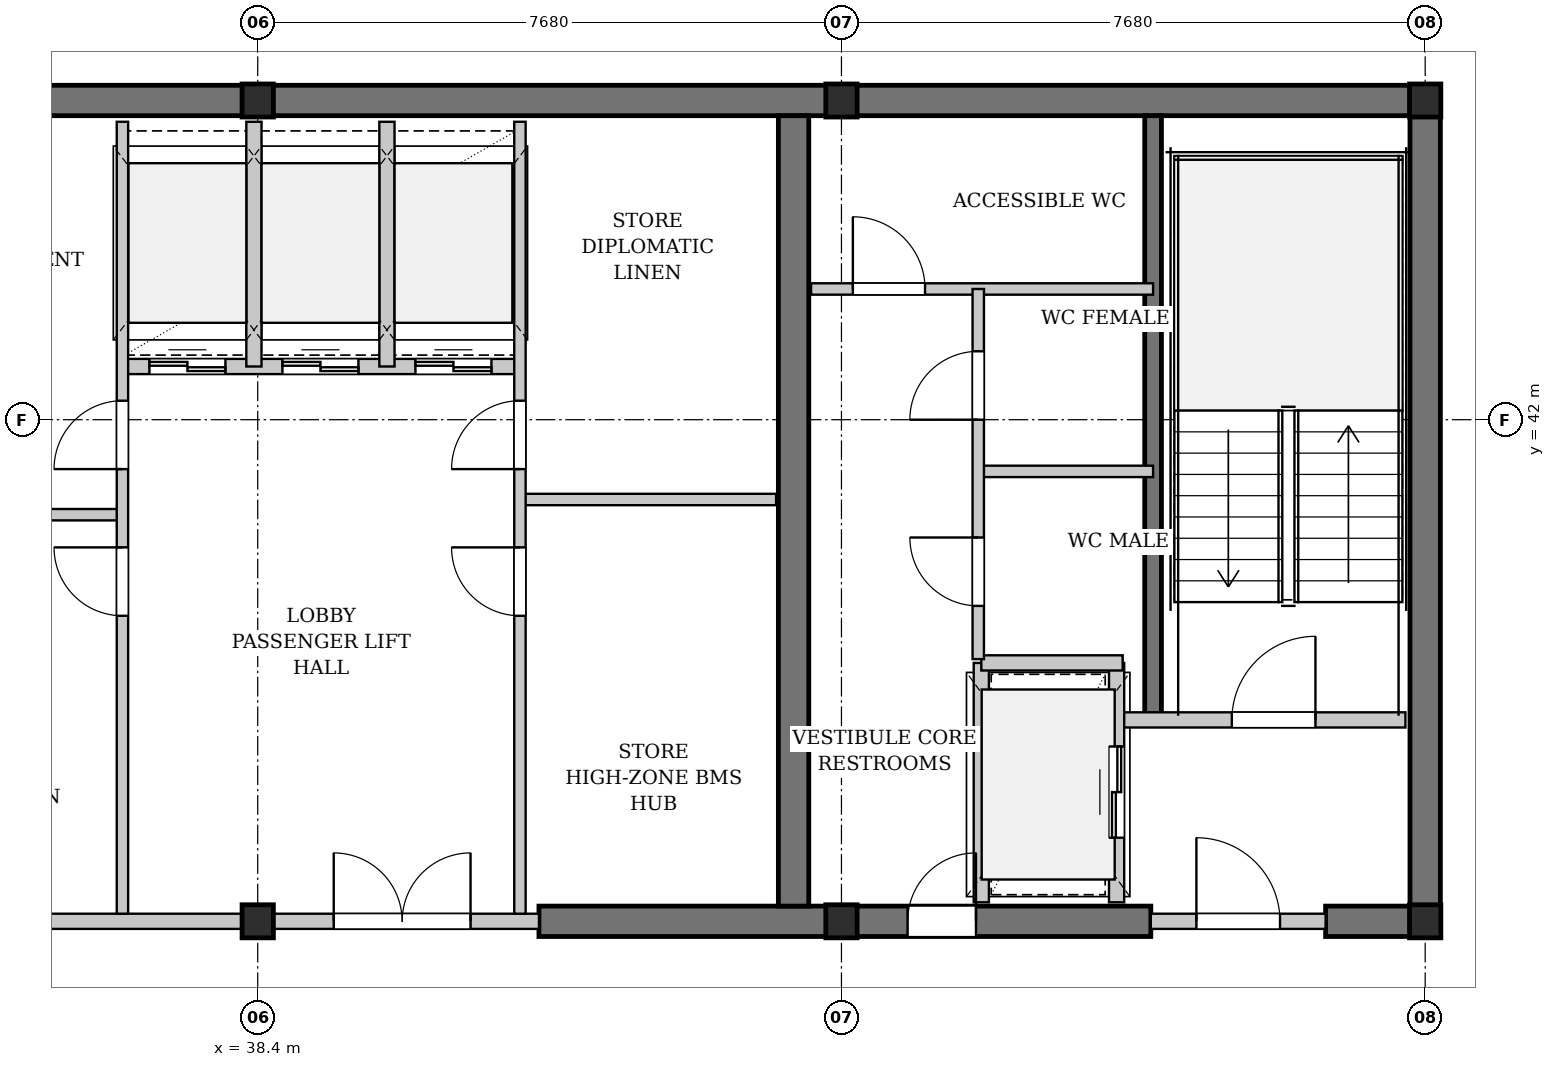
"""IFC4 building model, lengths in metres.
Left out: names, types, materials, properties, quantities, classifications, styles, units other than length and angle.
Written with IfcOpenShell. Run it as: python <this file> out.ifc"""

import sys

from ifc_helpers import new_model, si_unit, direction, frame, frame_2d, origin, origin_2d, place, context, subcontext, project, spatial, rectangle, i_section, extrude, element, fill, save


model = new_model("IFC4")
c1 = context("Model", 3, precision=1e-05, world=origin(), true_north=direction((0.0, 1.0)))
c2 = subcontext(c1, "Body", "Model", "MODEL_VIEW")
j1 = project(units=[si_unit("LENGTHUNIT", "METRE"), si_unit("PLANEANGLEUNIT", "RADIAN")], contexts=[c1])
p1 = place(None, origin())
s1 = spatial("IfcSite", under=j1, at=p1, CompositionType="ELEMENT")
p2 = place(p1, origin())
s2 = spatial("IfcBuilding", under=s1, at=p2, CompositionType="ELEMENT")
p3 = place(p2, frame((0.0, 0.0, 237.5)))
s3 = spatial("IfcBuildingStorey", under=s2, at=p3, CompositionType="ELEMENT", Elevation=237.5)
p4 = place(p3, frame((22.84, 46.2, 0.0), z_axis=(0.0, 0.0, 1.0), x_axis=(1.0, 0.0, 0.0)))
e1 = element("IfcWall", 1, at=p4, inside=s3, PredefinedType="SHEAR", context=c2, shape_type="SweptSolid", body=[
    extrude(rectangle(XDim=31.12, YDim=0.4, at=frame_2d((15.56, 0.0))), origin(), (0.0, 0.0, 1.0), 3.08),
])
p5 = place(p3, frame((42.1, 35.4, 0.0), z_axis=(0.0, 0.0, 1.0), x_axis=(1.0, 0.0, 0.0)))
e2 = element("IfcWall", 2, at=p5, inside=s3, PredefinedType="SHEAR", context=c2, shape_type="SweptSolid", body=[
    extrude(rectangle(XDim=8.05, YDim=0.4, at=frame_2d((4.025, 0.0))), origin(), (0.0, 0.0, 1.0), 3.08),
])
p6 = place(p5, frame((4.85, 0.0, 0.0)))
e3 = element("IfcOpeningElement", 3, at=p6, cuts=e2, PredefinedType="OPENING", context=c2, shape_type="SweptSolid", body=[
    extrude(rectangle(XDim=0.9, YDim=2.15, at=frame_2d((0.45, 1.075))), frame((0.0, 0.21, 0.0), z_axis=(0.0, -1.0, 0.0), x_axis=(1.0, 0.0, 0.0)), (0.0, 0.0, 1.0), 0.42),
])
p7 = place(p3, frame((52.45, 35.4, 0.0), z_axis=(0.0, 0.0, 1.0), x_axis=(1.0, 0.0, 0.0)))
e4 = element("IfcWall", 4, at=p7, inside=s3, PredefinedType="SHEAR", context=c2, shape_type="SweptSolid", body=[
    extrude(rectangle(XDim=1.51, YDim=0.4, at=frame_2d((0.755, 0.0))), origin(), (0.0, 0.0, 1.0), 3.08),
])
for number, where, z_axis, x_axis in (
    (5, (45.45, 35.6, 0.0), (0.0, 0.0, 1.0), (0.0, 1.0, 0.0)),
    (6, (53.76, 35.6, 0.0), (0.0, 0.0, 1.0), (0.0, 1.0, 0.0)),
):
    element("IfcWall", number, at=place(p3, frame(where, z_axis=z_axis, x_axis=x_axis)), inside=s3, PredefinedType="SHEAR", context=c2, shape_type="SweptSolid", body=[
        extrude(rectangle(XDim=10.4, YDim=0.4, at=frame_2d((5.2, 0.0))), origin(), (0.0, 0.0, 1.0), 3.08),
    ])
p8 = place(p3, frame((50.18, 38.05, 0.0), z_axis=(0.0, 0.0, 1.0), x_axis=(0.0, 1.0, 0.0)))
e7 = element("IfcWall", 7, at=p8, inside=s3, PredefinedType="SHEAR", context=c2, shape_type="SweptSolid", body=[
    extrude(rectangle(XDim=7.95, YDim=0.22, at=frame_2d((3.975, 0.0))), origin(), (0.0, 0.0, 1.0), 3.08),
])
for number, where, z_axis, x_axis in (
    (8, (38.4, 35.4, 0.0), (0.0, 0.0, 1.0), (1.0, 0.0, 0.0)),
    (9, (38.4, 46.2, 0.0), (0.0, 0.0, 1.0), (1.0, 0.0, 0.0)),
    (10, (46.08, 35.4, 0.0), (0.0, 0.0, 1.0), (1.0, 0.0, 0.0)),
    (11, (46.08, 46.2, 0.0), (0.0, 0.0, 1.0), (1.0, 0.0, 0.0)),
    (12, (53.76, 35.4, 0.0), (0.0, 0.0, 1.0), (1.0, 0.0, 0.0)),
    (13, (53.76, 46.2, 0.0), (0.0, 0.0, 1.0), (1.0, 0.0, 0.0)),
):
    element("IfcColumn", number, at=place(p3, frame(where, z_axis=z_axis, x_axis=x_axis)), inside=s3, PredefinedType="COLUMN", context=c2, shape_type="SweptSolid", body=[
        extrude(i_section(OverallWidth=0.412, OverallDepth=0.435, WebThickness=0.036, FlangeThickness=0.058, FilletRadius=0.015, at=origin_2d()), origin(), (0.0, 0.0, 1.0), 3.3),
    ])
p9 = place(p3, frame((35.6, 35.4, 0.0), z_axis=(0.0, 0.0, 1.0), x_axis=(1.0, 0.0, 0.0)))
e14 = element("IfcWall", 14, at=p9, inside=s3, PredefinedType="PARTITIONING", context=c2, shape_type="SweptSolid", body=[
    extrude(rectangle(XDim=6.5, YDim=0.2, at=frame_2d((3.25, 0.0))), origin(), (0.0, 0.0, 1.0), 2.313),
])
p10 = place(p9, frame((3.8, 0.0, 0.0)))
e15 = element("IfcOpeningElement", 15, at=p10, cuts=e14, PredefinedType="OPENING", context=c2, shape_type="SweptSolid", body=[
    extrude(rectangle(XDim=1.8, YDim=2.3, at=frame_2d((0.9, 1.15))), frame((0.0, 0.11, 0.0), z_axis=(0.0, -1.0, 0.0), x_axis=(1.0, 0.0, 0.0)), (0.0, 0.0, 1.0), 0.22),
])
p11 = place(p3, frame((36.6, 42.7, 0.0), z_axis=(0.0, 0.0, 1.0), x_axis=(1.0, 0.0, 0.0)))
e16 = element("IfcWall", 16, at=p11, inside=s3, PredefinedType="PARTITIONING", context=c2, shape_type="SweptSolid", body=[
    extrude(rectangle(XDim=5.25, YDim=0.2, at=frame_2d((2.625, 0.0))), origin(), (0.0, 0.0, 1.0), 3.08),
])
p12 = place(p11, frame((0.375, 0.0, 0.0)))
e17 = element("IfcOpeningElement", 17, at=p12, cuts=e16, PredefinedType="OPENING", context=c2, shape_type="SweptSolid", body=[
    extrude(rectangle(XDim=1.0, YDim=2.2, at=frame_2d((0.5, 1.1))), frame((0.0, 0.11, 0.0), z_axis=(0.0, -1.0, 0.0), x_axis=(1.0, 0.0, 0.0)), (0.0, 0.0, 1.0), 0.22),
])
p13 = place(p11, frame((2.125, 0.0, 0.0)))
e18 = element("IfcOpeningElement", 18, at=p13, cuts=e16, PredefinedType="OPENING", context=c2, shape_type="SweptSolid", body=[
    extrude(rectangle(XDim=1.0, YDim=2.2, at=frame_2d((0.5, 1.1))), frame((0.0, 0.11, 0.0), z_axis=(0.0, -1.0, 0.0), x_axis=(1.0, 0.0, 0.0)), (0.0, 0.0, 1.0), 0.22),
])
p14 = place(p11, frame((3.875, 0.0, 0.0)))
e19 = element("IfcOpeningElement", 19, at=p14, cuts=e16, PredefinedType="OPENING", context=c2, shape_type="SweptSolid", body=[
    extrude(rectangle(XDim=1.0, YDim=2.2, at=frame_2d((0.5, 1.1))), frame((0.0, 0.11, 0.0), z_axis=(0.0, -1.0, 0.0), x_axis=(1.0, 0.0, 0.0)), (0.0, 0.0, 1.0), 0.22),
])
p15 = place(p3, frame((38.35, 42.7, 0.0), z_axis=(0.0, 0.0, 1.0), x_axis=(0.0, 1.0, 0.0)))
e20 = element("IfcWall", 20, at=p15, inside=s3, PredefinedType="PARTITIONING", context=c2, shape_type="SweptSolid", body=[
    extrude(rectangle(XDim=3.22, YDim=0.2, at=frame_2d((1.61, 0.0))), origin(), (0.0, 0.0, 1.0), 2.313),
])
p16 = place(p3, frame((40.1, 42.7, 0.0), z_axis=(0.0, 0.0, 1.0), x_axis=(0.0, 1.0, 0.0)))
e21 = element("IfcWall", 21, at=p16, inside=s3, PredefinedType="PARTITIONING", context=c2, shape_type="SweptSolid", body=[
    extrude(rectangle(XDim=3.22, YDim=0.2, at=frame_2d((1.61, 0.0))), origin(), (0.0, 0.0, 1.0), 3.08),
])
p17 = place(p3, frame((33.05, 40.75, 0.0), z_axis=(0.0, 0.0, 1.0), x_axis=(1.0, 0.0, 0.0)))
e22 = element("IfcWall", 22, at=p17, inside=s3, PredefinedType="PARTITIONING", context=c2, shape_type="SweptSolid", body=[
    extrude(rectangle(XDim=3.57, YDim=0.15, at=frame_2d((1.785, 0.0))), origin(), (0.0, 0.0, 1.0), 3.08),
])
p18 = place(p3, frame((36.62, 35.5, 0.0), z_axis=(0.0, 0.0, 1.0), x_axis=(0.0, 1.0, 0.0)))
e23 = element("IfcWall", 23, at=p18, inside=s3, PredefinedType="PARTITIONING", context=c2, shape_type="SweptSolid", body=[
    extrude(rectangle(XDim=10.42, YDim=0.15, at=frame_2d((5.21, 0.0))), origin(), (0.0, 0.0, 1.0), 3.08),
])
p19 = place(p18, frame((3.92, 0.0, 0.0)))
e24 = element("IfcOpeningElement", 24, at=p19, cuts=e23, PredefinedType="OPENING", context=c2, shape_type="SweptSolid", body=[
    extrude(rectangle(XDim=0.9, YDim=2.15, at=frame_2d((0.45, 1.075))), frame((0.0, 0.085, 0.0), z_axis=(0.0, -1.0, 0.0), x_axis=(1.0, 0.0, 0.0)), (0.0, 0.0, 1.0), 0.17),
])
p20 = place(p18, frame((5.85, 0.0, 0.0)))
e25 = element("IfcOpeningElement", 25, at=p20, cuts=e23, PredefinedType="OPENING", context=c2, shape_type="SweptSolid", body=[
    extrude(rectangle(XDim=0.9, YDim=2.15, at=frame_2d((0.45, 1.075))), frame((0.0, 0.085, 0.0), z_axis=(0.0, -1.0, 0.0), x_axis=(1.0, 0.0, 0.0)), (0.0, 0.0, 1.0), 0.17),
])
p21 = place(p3, frame((41.85, 40.95, 0.0), z_axis=(0.0, 0.0, 1.0), x_axis=(1.0, 0.0, 0.0)))
e26 = element("IfcWall", 26, at=p21, inside=s3, PredefinedType="PARTITIONING", context=c2, shape_type="SweptSolid", body=[
    extrude(rectangle(XDim=3.37, YDim=0.15, at=frame_2d((1.685, 0.0))), origin(), (0.0, 0.0, 1.0), 3.08),
])
p22 = place(p3, frame((41.85, 35.5, 0.0), z_axis=(0.0, 0.0, 1.0), x_axis=(0.0, 1.0, 0.0)))
e27 = element("IfcWall", 27, at=p22, inside=s3, PredefinedType="PARTITIONING", context=c2, shape_type="SweptSolid", body=[
    extrude(rectangle(XDim=10.42, YDim=0.15, at=frame_2d((5.21, 0.0))), origin(), (0.0, 0.0, 1.0), 3.08),
])
p23 = place(p22, frame((3.92, 0.0, 0.0)))
e28 = element("IfcOpeningElement", 28, at=p23, cuts=e27, PredefinedType="OPENING", context=c2, shape_type="SweptSolid", body=[
    extrude(rectangle(XDim=0.9, YDim=2.15, at=frame_2d((0.45, 1.075))), frame((0.0, 0.085, 0.0), z_axis=(0.0, -1.0, 0.0), x_axis=(1.0, 0.0, 0.0)), (0.0, 0.0, 1.0), 0.17),
])
p24 = place(p22, frame((5.85, 0.0, 0.0)))
e29 = element("IfcOpeningElement", 29, at=p24, cuts=e27, PredefinedType="OPENING", context=c2, shape_type="SweptSolid", body=[
    extrude(rectangle(XDim=0.9, YDim=2.15, at=frame_2d((0.45, 1.075))), frame((0.0, 0.085, 0.0), z_axis=(0.0, -1.0, 0.0), x_axis=(1.0, 0.0, 0.0)), (0.0, 0.0, 1.0), 0.17),
])
p25 = place(p3, frame((49.78, 38.05, 0.0), z_axis=(0.0, 0.0, 1.0), x_axis=(1.0, 0.0, 0.0)))
e30 = element("IfcWall", 30, at=p25, inside=s3, PredefinedType="PARTITIONING", context=c2, shape_type="SweptSolid", body=[
    extrude(rectangle(XDim=3.72, YDim=0.2, at=frame_2d((1.86, 0.0))), origin(), (0.0, 0.0, 1.0), 3.08),
])
p26 = place(p25, frame((1.436, 0.0, 0.0)))
e31 = element("IfcOpeningElement", 31, at=p26, cuts=e30, PredefinedType="OPENING", context=c2, shape_type="SweptSolid", body=[
    extrude(rectangle(XDim=1.1, YDim=2.15, at=frame_2d((0.55, 1.075))), frame((0.0, 0.11, 0.0), z_axis=(0.0, -1.0, 0.0), x_axis=(1.0, 0.0, 0.0)), (0.0, 0.0, 1.0), 0.22),
])
p27 = place(p3, frame((50.15, 35.4, 0.0), z_axis=(0.0, 0.0, 1.0), x_axis=(1.0, 0.0, 0.0)))
e32 = element("IfcWall", 32, at=p27, inside=s3, PredefinedType="PARTITIONING", context=c2, shape_type="SweptSolid", body=[
    extrude(rectangle(XDim=2.3, YDim=0.2, at=frame_2d((1.15, 0.0))), origin(), (0.0, 0.0, 1.0), 2.313),
])
p28 = place(p27, frame((0.6, 0.0, 0.0)))
e33 = element("IfcOpeningElement", 33, at=p28, cuts=e32, PredefinedType="OPENING", context=c2, shape_type="SweptSolid", body=[
    extrude(rectangle(XDim=1.1, YDim=2.15, at=frame_2d((0.55, 1.075))), frame((0.0, 0.11, 0.0), z_axis=(0.0, -1.0, 0.0), x_axis=(1.0, 0.0, 0.0)), (0.0, 0.0, 1.0), 0.22),
])
p29 = place(p3, frame((49.7, 35.65, 0.0), z_axis=(0.0, 0.0, 1.0), x_axis=(0.0, 1.0, 0.0)))
e34 = element("IfcWall", 34, at=p29, inside=s3, PredefinedType="PARTITIONING", context=c2, shape_type="SweptSolid", body=[
    extrude(rectangle(XDim=3.15, YDim=0.2, at=frame_2d((1.575, 0.0))), origin(), (0.0, 0.0, 1.0), 3.08),
])
p30 = place(p29, frame((0.85, 0.0, 0.0)))
e35 = element("IfcOpeningElement", 35, at=p30, cuts=e34, PredefinedType="OPENING", context=c2, shape_type="SweptSolid", body=[
    extrude(rectangle(XDim=1.2, YDim=2.2, at=frame_2d((0.6, 1.1))), frame((0.0, 0.11, 0.0), z_axis=(0.0, -1.0, 0.0), x_axis=(1.0, 0.0, 0.0)), (0.0, 0.0, 1.0), 0.22),
])
p31 = place(p3, frame((47.92, 35.65, 0.0), z_axis=(0.0, 0.0, 1.0), x_axis=(0.0, 1.0, 0.0)))
e36 = element("IfcWall", 36, at=p31, inside=s3, PredefinedType="PARTITIONING", context=c2, shape_type="SweptSolid", body=[
    extrude(rectangle(XDim=3.15, YDim=0.2, at=frame_2d((1.575, 0.0))), origin(), (0.0, 0.0, 1.0), 3.08),
])
p32 = place(p3, frame((47.92, 38.8, 0.0), z_axis=(0.0, 0.0, 1.0), x_axis=(1.0, 0.0, 0.0)))
e37 = element("IfcWall", 37, at=p32, inside=s3, PredefinedType="PARTITIONING", context=c2, shape_type="SweptSolid", body=[
    extrude(rectangle(XDim=1.86, YDim=0.2, at=frame_2d((0.93, 0.0))), origin(), (0.0, 0.0, 1.0), 3.08),
])
p33 = place(p3, frame((45.68, 43.72, 0.0), z_axis=(0.0, 0.0, 1.0), x_axis=(1.0, 0.0, 0.0)))
e38 = element("IfcWall", 38, at=p33, inside=s3, PredefinedType="PARTITIONING", context=c2, shape_type="SweptSolid", body=[
    extrude(rectangle(XDim=4.5, YDim=0.15, at=frame_2d((2.25, 0.0))), origin(), (0.0, 0.0, 1.0), 3.08),
])
p34 = place(p33, frame((0.55, 0.0, 0.0)))
e39 = element("IfcOpeningElement", 39, at=p34, cuts=e38, PredefinedType="OPENING", context=c2, shape_type="SweptSolid", body=[
    extrude(rectangle(XDim=0.95, YDim=2.15, at=frame_2d((0.475, 1.075))), frame((0.0, 0.085, 0.0), z_axis=(0.0, -1.0, 0.0), x_axis=(1.0, 0.0, 0.0)), (0.0, 0.0, 1.0), 0.17),
])
p35 = place(p3, frame((47.88, 41.32, 0.0), z_axis=(0.0, 0.0, 1.0), x_axis=(1.0, 0.0, 0.0)))
e40 = element("IfcWall", 40, at=p35, inside=s3, PredefinedType="PARTITIONING", context=c2, shape_type="SweptSolid", body=[
    extrude(rectangle(XDim=2.3, YDim=0.15, at=frame_2d((1.15, 0.0))), origin(), (0.0, 0.0, 1.0), 3.08),
])
p36 = place(p3, frame((47.88, 38.85, 0.0), z_axis=(0.0, 0.0, 1.0), x_axis=(0.0, 1.0, 0.0)))
e41 = element("IfcWall", 41, at=p36, inside=s3, PredefinedType="PARTITIONING", context=c2, shape_type="SweptSolid", body=[
    extrude(rectangle(XDim=4.87, YDim=0.15, at=frame_2d((2.435, 0.0))), origin(), (0.0, 0.0, 1.0), 3.08),
])
p37 = place(p36, frame((0.7, 0.0, 0.0)))
e42 = element("IfcOpeningElement", 42, at=p37, cuts=e41, PredefinedType="OPENING", context=c2, shape_type="SweptSolid", body=[
    extrude(rectangle(XDim=0.9, YDim=2.15, at=frame_2d((0.45, 1.075))), frame((0.0, 0.085, 0.0), z_axis=(0.0, -1.0, 0.0), x_axis=(1.0, 0.0, 0.0)), (0.0, 0.0, 1.0), 0.17),
])
p38 = place(p36, frame((3.15, 0.0, 0.0)))
e43 = element("IfcOpeningElement", 43, at=p38, cuts=e41, PredefinedType="OPENING", context=c2, shape_type="SweptSolid", body=[
    extrude(rectangle(XDim=0.9, YDim=2.15, at=frame_2d((0.45, 1.075))), frame((0.0, 0.085, 0.0), z_axis=(0.0, -1.0, 0.0), x_axis=(1.0, 0.0, 0.0)), (0.0, 0.0, 1.0), 0.17),
])
p39 = place(p10, origin())
e44 = element("IfcDoor", 44, at=p39, inside=s3, OperationType="DOUBLE_DOOR_SINGLE_SWING", PredefinedType="DOOR", context=c2, shape_type="SweptSolid", body=[
    extrude(rectangle(XDim=1.8, YDim=2.3, at=frame_2d((0.9, 1.15))), frame((0.0, 0.025, 0.0), z_axis=(0.0, -1.0, 0.0), x_axis=(1.0, 0.0, 0.0)), (0.0, 0.0, 1.0), 0.05),
])
fill(e15, e44)
p40 = place(p12, origin())
e45 = element("IfcDoor", 45, at=p40, inside=s3, OperationType="DOUBLE_DOOR_SLIDING", PredefinedType="DOOR", context=c2, shape_type="SweptSolid", body=[
    extrude(rectangle(XDim=1.0, YDim=2.2, at=frame_2d((0.5, 1.1))), frame((0.0, 0.025, 0.0), z_axis=(0.0, -1.0, 0.0), x_axis=(1.0, 0.0, 0.0)), (0.0, 0.0, 1.0), 0.05),
])
fill(e17, e45)
p41 = place(p13, origin())
e46 = element("IfcDoor", 46, at=p41, inside=s3, OperationType="DOUBLE_DOOR_SLIDING", PredefinedType="DOOR", context=c2, shape_type="SweptSolid", body=[
    extrude(rectangle(XDim=1.0, YDim=2.2, at=frame_2d((0.5, 1.1))), frame((0.0, 0.025, 0.0), z_axis=(0.0, -1.0, 0.0), x_axis=(1.0, 0.0, 0.0)), (0.0, 0.0, 1.0), 0.05),
])
fill(e18, e46)
p42 = place(p14, origin())
e47 = element("IfcDoor", 47, at=p42, inside=s3, OperationType="DOUBLE_DOOR_SLIDING", PredefinedType="DOOR", context=c2, shape_type="SweptSolid", body=[
    extrude(rectangle(XDim=1.0, YDim=2.2, at=frame_2d((0.5, 1.1))), frame((0.0, 0.025, 0.0), z_axis=(0.0, -1.0, 0.0), x_axis=(1.0, 0.0, 0.0)), (0.0, 0.0, 1.0), 0.05),
])
fill(e19, e47)
p43 = place(p19, origin())
e48 = element("IfcDoor", 48, at=p43, inside=s3, OperationType="SINGLE_SWING_RIGHT", PredefinedType="DOOR", context=c2, shape_type="SweptSolid", body=[
    extrude(rectangle(XDim=0.9, YDim=2.15, at=frame_2d((0.45, 1.075))), frame((0.0, 0.025, 0.0), z_axis=(0.0, -1.0, 0.0), x_axis=(1.0, 0.0, 0.0)), (0.0, 0.0, 1.0), 0.05),
])
fill(e24, e48)
p44 = place(p20, origin())
e49 = element("IfcDoor", 49, at=p44, inside=s3, OperationType="SINGLE_SWING_LEFT", PredefinedType="DOOR", context=c2, shape_type="SweptSolid", body=[
    extrude(rectangle(XDim=0.9, YDim=2.15, at=frame_2d((0.45, 1.075))), frame((0.0, 0.025, 0.0), z_axis=(0.0, -1.0, 0.0), x_axis=(1.0, 0.0, 0.0)), (0.0, 0.0, 1.0), 0.05),
])
fill(e25, e49)
p45 = place(p23, origin())
e50 = element("IfcDoor", 50, at=p45, inside=s3, OperationType="SINGLE_SWING_RIGHT", PredefinedType="DOOR", context=c2, shape_type="SweptSolid", body=[
    extrude(rectangle(XDim=0.9, YDim=2.15, at=frame_2d((0.45, 1.075))), frame((0.0, 0.025, 0.0), z_axis=(0.0, -1.0, 0.0), x_axis=(1.0, 0.0, 0.0)), (0.0, 0.0, 1.0), 0.05),
])
fill(e28, e50)
p46 = place(p24, origin())
e51 = element("IfcDoor", 51, at=p46, inside=s3, OperationType="SINGLE_SWING_LEFT", PredefinedType="DOOR", context=c2, shape_type="SweptSolid", body=[
    extrude(rectangle(XDim=0.9, YDim=2.15, at=frame_2d((0.45, 1.075))), frame((0.0, 0.025, 0.0), z_axis=(0.0, -1.0, 0.0), x_axis=(1.0, 0.0, 0.0)), (0.0, 0.0, 1.0), 0.05),
])
fill(e29, e51)
p47 = place(p26, origin())
e52 = element("IfcDoor", 52, at=p47, inside=s3, OperationType="SINGLE_SWING_RIGHT", PredefinedType="DOOR", context=c2, shape_type="SweptSolid", body=[
    extrude(rectangle(XDim=1.1, YDim=2.15, at=frame_2d((0.55, 1.075))), frame((0.0, 0.025, 0.0), z_axis=(0.0, -1.0, 0.0), x_axis=(1.0, 0.0, 0.0)), (0.0, 0.0, 1.0), 0.05),
])
fill(e31, e52)
p48 = place(p28, origin())
e53 = element("IfcDoor", 53, at=p48, inside=s3, OperationType="SINGLE_SWING_LEFT", PredefinedType="DOOR", context=c2, shape_type="SweptSolid", body=[
    extrude(rectangle(XDim=1.1, YDim=2.15, at=frame_2d((0.55, 1.075))), frame((0.0, 0.025, 0.0), z_axis=(0.0, -1.0, 0.0), x_axis=(1.0, 0.0, 0.0)), (0.0, 0.0, 1.0), 0.05),
])
fill(e33, e53)
p49 = place(p30, origin())
e54 = element("IfcDoor", 54, at=p49, inside=s3, OperationType="DOUBLE_DOOR_SLIDING", PredefinedType="DOOR", context=c2, shape_type="SweptSolid", body=[
    extrude(rectangle(XDim=1.2, YDim=2.2, at=frame_2d((0.6, 1.1))), frame((0.0, 0.025, 0.0), z_axis=(0.0, -1.0, 0.0), x_axis=(1.0, 0.0, 0.0)), (0.0, 0.0, 1.0), 0.05),
])
fill(e35, e54)
p50 = place(p34, origin())
e55 = element("IfcDoor", 55, at=p50, inside=s3, OperationType="SINGLE_SWING_LEFT", PredefinedType="DOOR", context=c2, shape_type="SweptSolid", body=[
    extrude(rectangle(XDim=0.95, YDim=2.15, at=frame_2d((0.475, 1.075))), frame((0.0, 0.025, 0.0), z_axis=(0.0, -1.0, 0.0), x_axis=(1.0, 0.0, 0.0)), (0.0, 0.0, 1.0), 0.05),
])
fill(e39, e55)
p51 = place(p37, origin())
e56 = element("IfcDoor", 56, at=p51, inside=s3, OperationType="SINGLE_SWING_RIGHT", PredefinedType="DOOR", context=c2, shape_type="SweptSolid", body=[
    extrude(rectangle(XDim=0.9, YDim=2.15, at=frame_2d((0.45, 1.075))), frame((0.0, 0.025, 0.0), z_axis=(0.0, -1.0, 0.0), x_axis=(1.0, 0.0, 0.0)), (0.0, 0.0, 1.0), 0.05),
])
fill(e42, e56)
p52 = place(p38, origin())
e57 = element("IfcDoor", 57, at=p52, inside=s3, OperationType="SINGLE_SWING_LEFT", PredefinedType="DOOR", context=c2, shape_type="SweptSolid", body=[
    extrude(rectangle(XDim=0.9, YDim=2.15, at=frame_2d((0.45, 1.075))), frame((0.0, 0.025, 0.0), z_axis=(0.0, -1.0, 0.0), x_axis=(1.0, 0.0, 0.0)), (0.0, 0.0, 1.0), 0.05),
])
fill(e43, e57)
p53 = place(p6, origin())
e58 = element("IfcDoor", 58, at=p53, inside=s3, OperationType="SINGLE_SWING_RIGHT", PredefinedType="DOOR", context=c2, shape_type="SweptSolid", body=[
    extrude(rectangle(XDim=0.9, YDim=2.15, at=frame_2d((0.45, 1.075))), frame((0.0, 0.025, 0.0), z_axis=(0.0, -1.0, 0.0), x_axis=(1.0, 0.0, 0.0)), (0.0, 0.0, 1.0), 0.05),
])
fill(e3, e58)
save(model, sys.argv[1])
